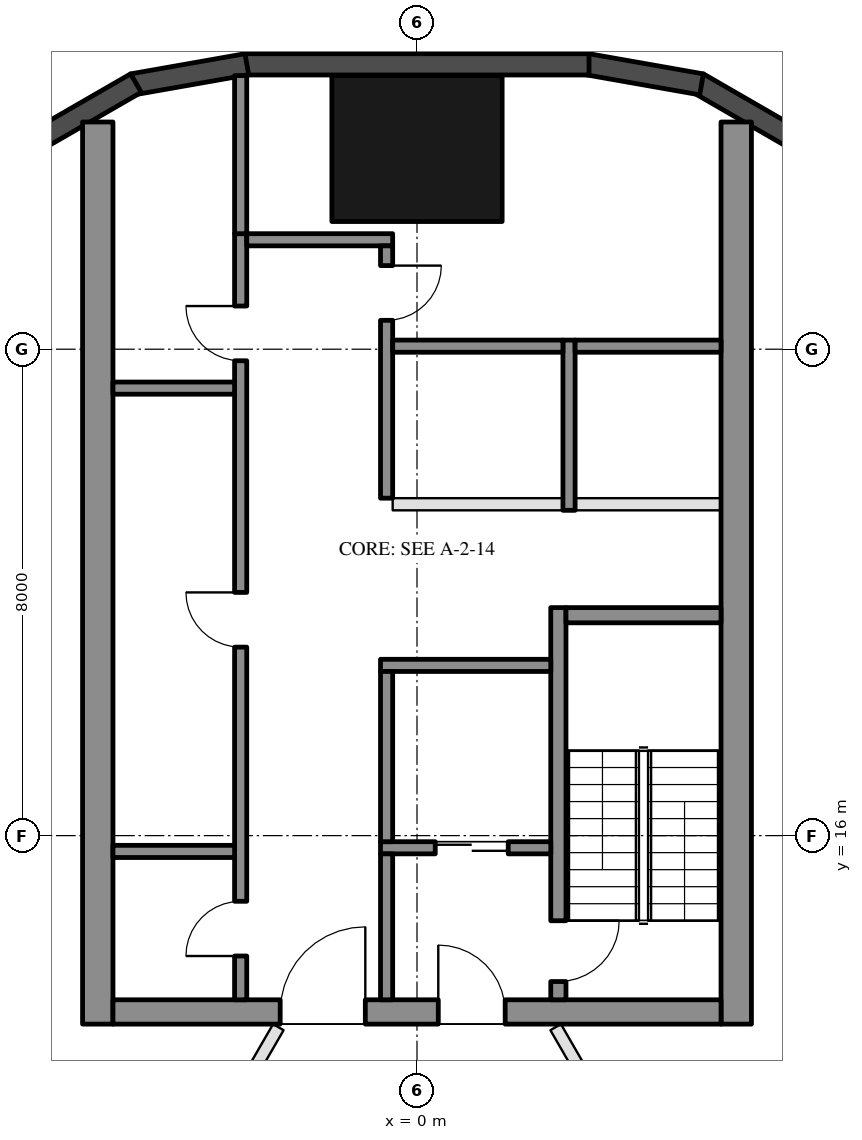
"""IFC4 building model, lengths in metres.
Left out: names, types, materials, properties, quantities, classifications, styles, units other than length and angle.
Written with IfcOpenShell. Run it as: python <this file> out.ifc"""

import sys

from ifc_helpers import new_model, si_unit, direction, frame, frame_2d, origin, origin_2d, place, context, subcontext, project, spatial, rectangle, hollow_rectangle, extrude, element, fill, save


model = new_model("IFC4")
c1 = context("Model", 3, precision=1e-05, world=origin(), true_north=direction((0.0, 1.0)))
c2 = subcontext(c1, "Body", "Model", "MODEL_VIEW")
j1 = project(units=[si_unit("LENGTHUNIT", "METRE"), si_unit("PLANEANGLEUNIT", "RADIAN")], contexts=[c1])
p1 = place(None, origin())
s1 = spatial("IfcSite", under=j1, at=p1, CompositionType="ELEMENT")
p2 = place(p1, origin())
s2 = spatial("IfcBuilding", under=s1, at=p2, CompositionType="ELEMENT")
p3 = place(p2, frame((0.0, 0.0, 72.4)))
s3 = spatial("IfcBuildingStorey", under=s2, at=p3, CompositionType="ELEMENT", Elevation=72.4)
p4 = place(p3, frame((0.0, 27.3, 0.0), z_axis=(0.0, 0.0, 1.0), x_axis=(1.0, 0.0, 0.0)))
e1 = element("IfcColumn", 1, at=p4, inside=s3, PredefinedType="COLUMN", context=c2, shape_type="SweptSolid", body=[
    extrude(hollow_rectangle(XDim=2.8, YDim=2.4, WallThickness=0.07, at=origin_2d()), origin(), (0.0, 0.0, 1.0), 3.7),
])
for number, where, z_axis, x_axis in (
    (2, (6.277, 27.422, 0.0), (0.0, 0.0, 1.0), (-0.866, 0.5, 0.0)),
    (3, (4.68, 28.356, 0.0), (0.0, 0.0, 1.0), (-0.985, 0.174, 0.0)),
):
    element("IfcWall", number, at=place(p3, frame(where, z_axis=z_axis, x_axis=x_axis)), inside=s3, PredefinedType="SOLIDWALL", context=c2, shape_type="SweptSolid", body=[
        extrude(rectangle(XDim=1.91, YDim=0.35, at=frame_2d((0.955, 0.0))), origin(), (0.0, 0.0, 1.0), 3.55),
    ])
p5 = place(p3, frame((2.829, 28.685, 0.0), z_axis=(0.0, 0.0, 1.0), x_axis=(-1.0, 0.0, 0.0)))
e4 = element("IfcWall", 4, at=p5, inside=s3, PredefinedType="SOLIDWALL", context=c2, shape_type="SweptSolid", body=[
    extrude(rectangle(XDim=5.658, YDim=0.35, at=frame_2d((2.829, 0.0))), origin(), (0.0, 0.0, 1.0), 3.55),
])
for number, where, z_axis, x_axis in (
    (5, (-2.799, 28.688, 0.0), (0.0, 0.0, 1.0), (-0.985, -0.174, 0.0)),
    (6, (-4.623, 28.377, 0.0), (0.0, 0.0, 1.0), (-0.866, -0.5, 0.0)),
):
    element("IfcWall", number, at=place(p3, frame(where, z_axis=z_axis, x_axis=x_axis)), inside=s3, PredefinedType="SOLIDWALL", context=c2, shape_type="SweptSolid", body=[
        extrude(rectangle(XDim=1.91, YDim=0.35, at=frame_2d((0.955, 0.0))), origin(), (0.0, 0.0, 1.0), 3.55),
    ])
for number, where, z_axis, x_axis in (
    (7, (5.25, 12.9, 0.0), (0.0, 0.0, 1.0), (0.0, 1.0, 0.0)),
    (8, (-5.25, 12.9, 0.0), (0.0, 0.0, 1.0), (0.0, 1.0, 0.0)),
):
    element("IfcWall", number, at=place(p3, frame(where, z_axis=z_axis, x_axis=x_axis)), inside=s3, PredefinedType="SHEAR", context=c2, shape_type="SweptSolid", body=[
        extrude(rectangle(XDim=14.837, YDim=0.5, at=frame_2d((7.418, 0.0))), origin(), (0.0, 0.0, 1.0), 3.5),
    ])
p6 = place(p3, frame((5.0, 13.1, 0.0), z_axis=(0.0, 0.0, 1.0), x_axis=(-1.0, 0.0, 0.0)))
e9 = element("IfcWall", 9, at=p6, inside=s3, PredefinedType="SHEAR", context=c2, shape_type="SweptSolid", body=[
    extrude(rectangle(XDim=10.0, YDim=0.4, at=frame_2d((5.0, 0.0))), origin(), (0.0, 0.0, 1.0), 3.5),
])
p7 = place(p6, frame((3.55, 0.0, 0.0)))
e10 = element("IfcOpeningElement", 10, at=p7, cuts=e9, PredefinedType="OPENING", context=c2, shape_type="SweptSolid", body=[
    extrude(rectangle(XDim=1.1, YDim=2.1, at=frame_2d((0.55, 1.05))), frame((0.0, 0.21, 0.0), z_axis=(0.0, -1.0, 0.0), x_axis=(1.0, 0.0, 0.0)), (0.0, 0.0, 1.0), 0.42),
])
p8 = place(p6, frame((5.85, 0.0, 0.0)))
e11 = element("IfcOpeningElement", 11, at=p8, cuts=e9, PredefinedType="OPENING", context=c2, shape_type="SweptSolid", body=[
    extrude(rectangle(XDim=1.4, YDim=2.1, at=frame_2d((0.7, 1.05))), frame((0.0, 0.21, 0.0), z_axis=(0.0, -1.0, 0.0), x_axis=(1.0, 0.0, 0.0)), (0.0, 0.0, 1.0), 0.42),
])
p9 = place(p3, frame((2.325, 13.3, 0.0), z_axis=(0.0, 0.0, 1.0), x_axis=(0.0, 1.0, 0.0)))
e12 = element("IfcWall", 12, at=p9, inside=s3, PredefinedType="SHEAR", context=c2, shape_type="SweptSolid", body=[
    extrude(rectangle(XDim=6.45, YDim=0.25, at=frame_2d((3.225, 0.0))), origin(), (0.0, 0.0, 1.0), 3.5),
])
p10 = place(p9, frame((0.3, 0.0, 0.0)))
e13 = element("IfcOpeningElement", 13, at=p10, cuts=e12, PredefinedType="OPENING", context=c2, shape_type="SweptSolid", body=[
    extrude(rectangle(XDim=1.0, YDim=2.1, at=frame_2d((0.5, 1.05))), frame((0.0, 0.135, 0.0), z_axis=(0.0, -1.0, 0.0), x_axis=(1.0, 0.0, 0.0)), (0.0, 0.0, 1.0), 0.27),
])
p11 = place(p3, frame((5.0, 19.625, 0.0), z_axis=(0.0, 0.0, 1.0), x_axis=(-1.0, 0.0, 0.0)))
e14 = element("IfcWall", 14, at=p11, inside=s3, PredefinedType="SHEAR", context=c2, shape_type="SweptSolid", body=[
    extrude(rectangle(XDim=2.55, YDim=0.25, at=frame_2d((1.275, 0.0))), origin(), (0.0, 0.0, 1.0), 3.5),
])
p12 = place(p3, frame((2.2, 18.8, 0.0), z_axis=(0.0, 0.0, 1.0), x_axis=(-1.0, 0.0, 0.0)))
e15 = element("IfcWall", 15, at=p12, inside=s3, PredefinedType="SHEAR", context=c2, shape_type="SweptSolid", body=[
    extrude(rectangle(XDim=2.8, YDim=0.2, at=frame_2d((1.4, 0.0))), origin(), (0.0, 0.0, 1.0), 3.5),
])
p13 = place(p3, frame((2.2, 15.8, 0.0), z_axis=(0.0, 0.0, 1.0), x_axis=(-1.0, 0.0, 0.0)))
e16 = element("IfcWall", 16, at=p13, inside=s3, PredefinedType="SHEAR", context=c2, shape_type="SweptSolid", body=[
    extrude(rectangle(XDim=2.8, YDim=0.2, at=frame_2d((1.4, 0.0))), origin(), (0.0, 0.0, 1.0), 3.5),
])
p14 = place(p13, frame((0.7, 0.0, 0.0)))
e17 = element("IfcOpeningElement", 17, at=p14, cuts=e16, PredefinedType="OPENING", context=c2, shape_type="SweptSolid", body=[
    extrude(rectangle(XDim=1.2, YDim=2.1, at=frame_2d((0.6, 1.05))), frame((0.0, 0.11, 0.0), z_axis=(0.0, -1.0, 0.0), x_axis=(1.0, 0.0, 0.0)), (0.0, 0.0, 1.0), 0.22),
])
p15 = place(p3, frame((-0.5, 15.9, 0.0), z_axis=(0.0, 0.0, 1.0), x_axis=(0.0, 1.0, 0.0)))
e18 = element("IfcWall", 18, at=p15, inside=s3, PredefinedType="SHEAR", context=c2, shape_type="SweptSolid", body=[
    extrude(rectangle(XDim=2.8, YDim=0.2, at=frame_2d((1.4, 0.0))), origin(), (0.0, 0.0, 1.0), 3.5),
])
p16 = place(p3, frame((-0.5, 13.3, 0.0), z_axis=(0.0, 0.0, 1.0), x_axis=(0.0, 1.0, 0.0)))
e19 = element("IfcWall", 19, at=p16, inside=s3, PredefinedType="SHEAR", context=c2, shape_type="SweptSolid", body=[
    extrude(rectangle(XDim=2.4, YDim=0.2, at=frame_2d((1.2, 0.0))), origin(), (0.0, 0.0, 1.0), 3.5),
])
p17 = place(p3, frame((-2.9, 13.3, 0.0), z_axis=(0.0, 0.0, 1.0), x_axis=(0.0, 1.0, 0.0)))
e20 = element("IfcWall", 20, at=p17, inside=s3, PredefinedType="SHEAR", context=c2, shape_type="SweptSolid", body=[
    extrude(rectangle(XDim=12.6, YDim=0.2, at=frame_2d((6.3, 0.0))), origin(), (0.0, 0.0, 1.0), 3.5),
])
p18 = place(p17, frame((0.72, 0.0, 0.0)))
e21 = element("IfcOpeningElement", 21, at=p18, cuts=e20, PredefinedType="OPENING", context=c2, shape_type="SweptSolid", body=[
    extrude(rectangle(XDim=0.9, YDim=2.1, at=frame_2d((0.45, 1.05))), frame((0.0, 0.11, 0.0), z_axis=(0.0, -1.0, 0.0), x_axis=(1.0, 0.0, 0.0)), (0.0, 0.0, 1.0), 0.22),
])
p19 = place(p17, frame((5.8, 0.0, 0.0)))
e22 = element("IfcOpeningElement", 22, at=p19, cuts=e20, PredefinedType="OPENING", context=c2, shape_type="SweptSolid", body=[
    extrude(rectangle(XDim=0.9, YDim=2.1, at=frame_2d((0.45, 1.05))), frame((0.0, 0.11, 0.0), z_axis=(0.0, -1.0, 0.0), x_axis=(1.0, 0.0, 0.0)), (0.0, 0.0, 1.0), 0.22),
])
p20 = place(p17, frame((10.51, 0.0, 0.0)))
e23 = element("IfcOpeningElement", 23, at=p20, cuts=e20, PredefinedType="OPENING", context=c2, shape_type="SweptSolid", body=[
    extrude(rectangle(XDim=0.9, YDim=2.1, at=frame_2d((0.45, 1.05))), frame((0.0, 0.11, 0.0), z_axis=(0.0, -1.0, 0.0), x_axis=(1.0, 0.0, 0.0)), (0.0, 0.0, 1.0), 0.22),
])
p21 = place(p3, frame((-0.4, 25.8, 0.0), z_axis=(0.0, 0.0, 1.0), x_axis=(-1.0, 0.0, 0.0)))
e24 = element("IfcWall", 24, at=p21, inside=s3, PredefinedType="SHEAR", context=c2, shape_type="SweptSolid", body=[
    extrude(rectangle(XDim=2.4, YDim=0.2, at=frame_2d((1.2, 0.0))), origin(), (0.0, 0.0, 1.0), 3.5),
])
p22 = place(p3, frame((-0.5, 21.55, 0.0), z_axis=(0.0, 0.0, 1.0), x_axis=(0.0, 1.0, 0.0)))
e25 = element("IfcWall", 25, at=p22, inside=s3, PredefinedType="SHEAR", context=c2, shape_type="SweptSolid", body=[
    extrude(rectangle(XDim=4.15, YDim=0.2, at=frame_2d((2.075, 0.0))), origin(), (0.0, 0.0, 1.0), 3.5),
])
p23 = place(p22, frame((2.925, 0.0, 0.0)))
e26 = element("IfcOpeningElement", 26, at=p23, cuts=e25, PredefinedType="OPENING", context=c2, shape_type="SweptSolid", body=[
    extrude(rectangle(XDim=0.9, YDim=2.1, at=frame_2d((0.45, 1.05))), frame((0.0, 0.11, 0.0), z_axis=(0.0, -1.0, 0.0), x_axis=(1.0, 0.0, 0.0)), (0.0, 0.0, 1.0), 0.22),
])
for number, where, z_axis, x_axis in (
    (27, (-3.0, 15.74, 0.0), (0.0, 0.0, 1.0), (-1.0, 0.0, 0.0)),
    (28, (-3.0, 23.36, 0.0), (0.0, 0.0, 1.0), (-1.0, 0.0, 0.0)),
):
    element("IfcWall", number, at=place(p3, frame(where, z_axis=z_axis, x_axis=x_axis)), inside=s3, PredefinedType="SHEAR", context=c2, shape_type="SweptSolid", body=[
        extrude(rectangle(XDim=2.0, YDim=0.2, at=frame_2d((1.0, 0.0))), origin(), (0.0, 0.0, 1.0), 3.5),
    ])
p24 = place(p3, frame((-2.9, 25.9, 0.0), z_axis=(0.0, 0.0, 1.0), x_axis=(0.0, 1.0, 0.0)))
e29 = element("IfcWall", 29, at=p24, inside=s3, PredefinedType="SHEAR", context=c2, shape_type="SweptSolid", body=[
    extrude(rectangle(XDim=2.6, YDim=0.2, at=frame_2d((1.3, 0.0))), origin(), (0.0, 0.0, 1.0), 3.5),
])
p25 = place(p3, frame((2.5, 21.35, 0.0), z_axis=(0.0, 0.0, 1.0), x_axis=(0.0, 1.0, 0.0)))
e30 = element("IfcWall", 30, at=p25, inside=s3, PredefinedType="SHEAR", context=c2, shape_type="SweptSolid", body=[
    extrude(rectangle(XDim=2.8, YDim=0.2, at=frame_2d((1.4, 0.0))), origin(), (0.0, 0.0, 1.0), 3.5),
])
p26 = place(p3, frame((5.0, 24.05, 0.0), z_axis=(0.0, 0.0, 1.0), x_axis=(-1.0, 0.0, 0.0)))
e31 = element("IfcWall", 31, at=p26, inside=s3, PredefinedType="SHEAR", context=c2, shape_type="SweptSolid", body=[
    extrude(rectangle(XDim=2.4, YDim=0.2, at=frame_2d((1.2, 0.0))), origin(), (0.0, 0.0, 1.0), 3.5),
])
p27 = place(p3, frame((2.4, 24.05, 0.0), z_axis=(0.0, 0.0, 1.0), x_axis=(-1.0, 0.0, 0.0)))
e32 = element("IfcWall", 32, at=p27, inside=s3, PredefinedType="SHEAR", context=c2, shape_type="SweptSolid", body=[
    extrude(rectangle(XDim=2.8, YDim=0.2, at=frame_2d((1.4, 0.0))), origin(), (0.0, 0.0, 1.0), 3.5),
])
p28 = place(p3, frame((5.0, 21.45, 0.0), z_axis=(0.0, 0.0, 1.0), x_axis=(-1.0, 0.0, 0.0)))
e33 = element("IfcWall", 33, at=p28, inside=s3, PredefinedType="PARTITIONING", context=c2, shape_type="SweptSolid", body=[
    extrude(rectangle(XDim=2.4, YDim=0.2, at=frame_2d((1.2, 0.0))), origin(), (0.0, 0.0, 1.0), 3.5),
])
p29 = place(p3, frame((2.4, 21.45, 0.0), z_axis=(0.0, 0.0, 1.0), x_axis=(-1.0, 0.0, 0.0)))
e34 = element("IfcWall", 34, at=p29, inside=s3, PredefinedType="PARTITIONING", context=c2, shape_type="SweptSolid", body=[
    extrude(rectangle(XDim=2.8, YDim=0.2, at=frame_2d((1.4, 0.0))), origin(), (0.0, 0.0, 1.0), 3.5),
])
p30 = place(p3, frame((-13.556, 13.281, 0.0), z_axis=(0.0, 0.0, 1.0), x_axis=(0.889110909618, -0.457691807223, 0.0)))
e35 = element("IfcWall", 35, at=p30, inside=s3, PredefinedType="PARTITIONING", context=c2, shape_type="SweptSolid", body=[
    extrude(rectangle(XDim=10.092, YDim=0.2, at=frame_2d((5.046, 0.0))), origin(), (0.0, 0.0, 1.0), 2.96),
])
p31 = place(p3, frame((2.281, 12.85, 0.0), z_axis=(0.0, 0.0, 1.0), x_axis=(0.499986710104, -0.866033076574, 0.0)))
e36 = element("IfcWall", 36, at=p31, inside=s3, PredefinedType="PARTITIONING", context=c2, shape_type="SweptSolid", body=[
    extrude(rectangle(XDim=9.384, YDim=0.2, at=frame_2d((4.692, 0.0))), origin(), (0.0, 0.0, 1.0), 2.95),
])
p32 = place(p31, frame((4.192, 0.0, 0.0)))
e37 = element("IfcOpeningElement", 37, at=p32, cuts=e36, PredefinedType="OPENING", context=c2, shape_type="SweptSolid", body=[
    extrude(rectangle(XDim=1.0, YDim=2.1, at=frame_2d((0.5, 1.05))), frame((0.0, 0.11, 0.0), z_axis=(0.0, -1.0, 0.0), x_axis=(1.0, 0.0, 0.0)), (0.0, 0.0, 1.0), 0.22),
])
p33 = place(p3, frame((-4.622, 8.794, 0.0), z_axis=(0.0, 0.0, 1.0), x_axis=(0.499979668266, 0.866037141998, 0.0)))
e38 = element("IfcWall", 38, at=p33, inside=s3, PredefinedType="PARTITIONING", context=c2, shape_type="SweptSolid", body=[
    extrude(rectangle(XDim=4.683, YDim=0.2, at=frame_2d((2.342, 0.0))), origin(), (0.0, 0.0, 1.0), 2.95),
])
p34 = place(p33, frame((1.842, 0.0, 0.0)))
e39 = element("IfcOpeningElement", 39, at=p34, cuts=e38, PredefinedType="OPENING", context=c2, shape_type="SweptSolid", body=[
    extrude(rectangle(XDim=1.0, YDim=2.1, at=frame_2d((0.5, 1.05))), frame((0.0, 0.11, 0.0), z_axis=(0.0, -1.0, 0.0), x_axis=(1.0, 0.0, 0.0)), (0.0, 0.0, 1.0), 0.22),
])
p35 = place(p14, origin())
e40 = element("IfcDoor", 40, at=p35, inside=s3, OperationType="DOUBLE_DOOR_SLIDING", PredefinedType="DOOR", context=c2, shape_type="SweptSolid", body=[
    extrude(rectangle(XDim=1.2, YDim=2.1, at=frame_2d((0.6, 1.05))), frame((0.0, 0.025, 0.0), z_axis=(0.0, -1.0, 0.0), x_axis=(1.0, 0.0, 0.0)), (0.0, 0.0, 1.0), 0.05),
])
fill(e17, e40)
p36 = place(p18, origin())
e41 = element("IfcDoor", 41, at=p36, inside=s3, OperationType="SINGLE_SWING_LEFT", PredefinedType="DOOR", context=c2, shape_type="SweptSolid", body=[
    extrude(rectangle(XDim=0.9, YDim=2.1, at=frame_2d((0.45, 1.05))), frame((0.0, 0.025, 0.0), z_axis=(0.0, -1.0, 0.0), x_axis=(1.0, 0.0, 0.0)), (0.0, 0.0, 1.0), 0.05),
])
fill(e21, e41)
p37 = place(p19, origin())
e42 = element("IfcDoor", 42, at=p37, inside=s3, OperationType="SINGLE_SWING_RIGHT", PredefinedType="DOOR", context=c2, shape_type="SweptSolid", body=[
    extrude(rectangle(XDim=0.9, YDim=2.1, at=frame_2d((0.45, 1.05))), frame((0.0, 0.025, 0.0), z_axis=(0.0, -1.0, 0.0), x_axis=(1.0, 0.0, 0.0)), (0.0, 0.0, 1.0), 0.05),
])
fill(e22, e42)
p38 = place(p20, origin())
e43 = element("IfcDoor", 43, at=p38, inside=s3, OperationType="SINGLE_SWING_RIGHT", PredefinedType="DOOR", context=c2, shape_type="SweptSolid", body=[
    extrude(rectangle(XDim=0.9, YDim=2.1, at=frame_2d((0.45, 1.05))), frame((0.0, 0.025, 0.0), z_axis=(0.0, -1.0, 0.0), x_axis=(1.0, 0.0, 0.0)), (0.0, 0.0, 1.0), 0.05),
])
fill(e23, e43)
p39 = place(p23, frame((0.9, 0.0, 0.0), z_axis=(0.0, 0.0, 1.0), x_axis=(-1.0, 0.0, 0.0)))
e44 = element("IfcDoor", 44, at=p39, inside=s3, OperationType="SINGLE_SWING_LEFT", PredefinedType="DOOR", context=c2, shape_type="SweptSolid", body=[
    extrude(rectangle(XDim=0.9, YDim=2.1, at=frame_2d((0.45, 1.05))), frame((0.0, 0.025, 0.0), z_axis=(0.0, -1.0, 0.0), x_axis=(1.0, 0.0, 0.0)), (0.0, 0.0, 1.0), 0.05),
])
fill(e26, e44)
p40 = place(p7, frame((1.1, 0.0, 0.0), z_axis=(0.0, 0.0, 1.0), x_axis=(-1.0, 0.0, 0.0)))
e45 = element("IfcDoor", 45, at=p40, inside=s3, OperationType="SINGLE_SWING_LEFT", PredefinedType="DOOR", context=c2, shape_type="SweptSolid", body=[
    extrude(rectangle(XDim=1.1, YDim=2.1, at=frame_2d((0.55, 1.05))), frame((0.0, 0.025, 0.0), z_axis=(0.0, -1.0, 0.0), x_axis=(1.0, 0.0, 0.0)), (0.0, 0.0, 1.0), 0.05),
])
fill(e10, e45)
p41 = place(p8, frame((1.4, 0.0, 0.0), z_axis=(0.0, 0.0, 1.0), x_axis=(-1.0, 0.0, 0.0)))
e46 = element("IfcDoor", 46, at=p41, inside=s3, OperationType="DOUBLE_DOOR_SINGLE_SWING", PredefinedType="DOOR", context=c2, shape_type="SweptSolid", body=[
    extrude(rectangle(XDim=1.4, YDim=2.1, at=frame_2d((0.7, 1.05))), frame((0.0, 0.025, 0.0), z_axis=(0.0, -1.0, 0.0), x_axis=(1.0, 0.0, 0.0)), (0.0, 0.0, 1.0), 0.05),
])
fill(e11, e46)
p42 = place(p10, frame((1.0, 0.0, 0.0), z_axis=(0.0, 0.0, 1.0), x_axis=(-1.0, 0.0, 0.0)))
e47 = element("IfcDoor", 47, at=p42, inside=s3, OperationType="SINGLE_SWING_LEFT", PredefinedType="DOOR", context=c2, shape_type="SweptSolid", body=[
    extrude(rectangle(XDim=1.0, YDim=2.1, at=frame_2d((0.5, 1.05))), frame((0.0, 0.025, 0.0), z_axis=(0.0, -1.0, 0.0), x_axis=(1.0, 0.0, 0.0)), (0.0, 0.0, 1.0), 0.05),
])
fill(e13, e47)
save(model, sys.argv[1])
